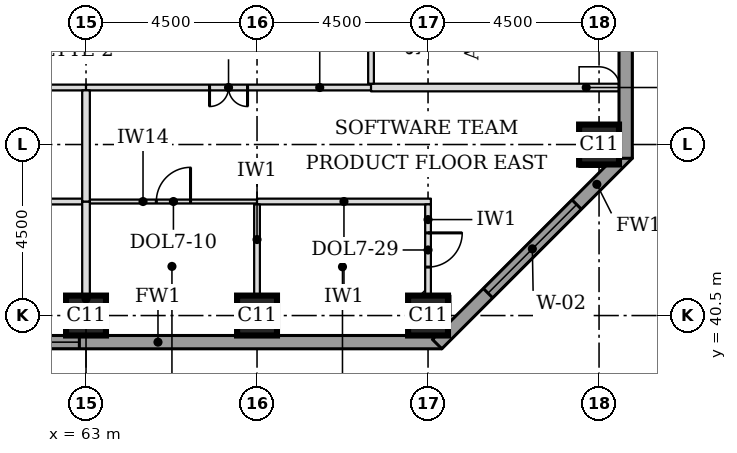
"""IFC4 building model, lengths in metres.
Left out: names, types, materials, properties, quantities, classifications, styles, units other than length and angle.
Written with IfcOpenShell. Run it as: python <this file> out.ifc"""

import sys

from ifc_helpers import new_model, si_unit, direction, frame, frame_2d, origin, origin_2d, place, context, subcontext, project, spatial, rectangle, extrude, element, fill, save


model = new_model("IFC4")
c1 = context("Model", 3, precision=1e-05, world=origin(), true_north=direction((0.0, 1.0)))
c2 = subcontext(c1, "Body", "Model", "MODEL_VIEW")
j1 = project(units=[si_unit("LENGTHUNIT", "METRE"), si_unit("PLANEANGLEUNIT", "RADIAN")], contexts=[c1])
p1 = place(None, origin())
s1 = spatial("IfcSite", under=j1, at=p1, CompositionType="ELEMENT")
p2 = place(p1, origin())
s2 = spatial("IfcBuilding", under=s1, at=p2, CompositionType="ELEMENT")
p3 = place(p2, frame((0.0, 0.0, 127.0)))
s3 = spatial("IfcBuildingStorey", under=s2, at=p3, CompositionType="ELEMENT", Elevation=127.0)
for number, where, z_axis, x_axis in (
    (1, (63.0, 40.5, 0.0), (0.0, 0.0, 1.0), (1.0, 0.0, 0.0)),
    (2, (67.5, 40.5, 0.0), (0.0, 0.0, 1.0), (1.0, 0.0, 0.0)),
    (3, (72.0, 40.5, 0.0), (0.0, 0.0, 1.0), (1.0, 0.0, 0.0)),
    (4, (76.5, 45.0, 0.0), (0.0, 0.0, 1.0), (1.0, 0.0, 0.0)),
):
    element("IfcColumn", number, at=place(p3, frame(where, z_axis=z_axis, x_axis=x_axis)), inside=s3, PredefinedType="COLUMN", context=c2, shape_type="SweptSolid", body=[
        extrude(rectangle(XDim=1.05, YDim=1.05, at=origin_2d()), origin(), (0.0, 0.0, 1.0), 3.7),
    ])
p4 = place(p3, frame((59.025, 39.8, 0.0), z_axis=(0.0, 0.0, 1.0), x_axis=(1.0, 0.0, 0.0)))
e5 = element("IfcWall", 5, at=p4, inside=s3, PredefinedType="STANDARD", context=c2, shape_type="SweptSolid", body=[
    extrude(rectangle(XDim=13.337, YDim=0.35, at=frame_2d((6.669, 0.0))), origin(), (0.0, 0.0, 1.0), 3.525),
])
p5 = place(p4, frame((0.5, 0.0, 0.9)))
e6 = element("IfcOpeningElement", 6, at=p5, cuts=e5, PredefinedType="OPENING", context=c2, shape_type="SweptSolid", body=[
    extrude(rectangle(XDim=3.3, YDim=1.9, at=frame_2d((1.65, 0.95))), frame((0.0, 0.185, 0.0), z_axis=(0.0, -1.0, 0.0), x_axis=(1.0, 0.0, 0.0)), (0.0, 0.0, 1.0), 0.37),
])
p6 = place(p3, frame((72.239, 39.749, 0.0), z_axis=(0.0, 0.0, 1.0), x_axis=(0.707106781187, 0.707106781187, 0.0)))
e7 = element("IfcWall", 7, at=p6, inside=s3, PredefinedType="STANDARD", context=c2, shape_type="SweptSolid", body=[
    extrude(rectangle(XDim=7.089, YDim=0.35, at=frame_2d((3.544, 0.0))), origin(), (0.0, 0.0, 1.0), 3.525),
])
p7 = place(p6, frame((1.894, 0.0, 0.9)))
e8 = element("IfcOpeningElement", 8, at=p7, cuts=e7, PredefinedType="OPENING", context=c2, shape_type="SweptSolid", body=[
    extrude(rectangle(XDim=3.3, YDim=1.9, at=frame_2d((1.65, 0.95))), frame((0.0, 0.185, 0.0), z_axis=(0.0, -1.0, 0.0), x_axis=(1.0, 0.0, 0.0)), (0.0, 0.0, 1.0), 0.37),
])
p8 = place(p3, frame((77.2, 44.638, 0.0), z_axis=(0.0, 0.0, 1.0), x_axis=(0.0, 1.0, 0.0)))
e9 = element("IfcWall", 9, at=p8, inside=s3, PredefinedType="STANDARD", context=c2, shape_type="SweptSolid", body=[
    extrude(rectangle(XDim=32.225, YDim=0.35, at=frame_2d((16.112, 0.0))), origin(), (0.0, 0.0, 1.0), 3.525),
])
p9 = place(p8, frame((5.462, 0.0, 0.9)))
e10 = element("IfcOpeningElement", 10, at=p9, cuts=e9, PredefinedType="OPENING", context=c2, shape_type="SweptSolid", body=[
    extrude(rectangle(XDim=3.3, YDim=1.9, at=frame_2d((1.65, 0.95))), frame((0.0, 0.185, 0.0), z_axis=(0.0, -1.0, 0.0), x_axis=(1.0, 0.0, 0.0)), (0.0, 0.0, 1.0), 0.37),
])
p10 = place(p8, frame((9.962, 0.0, 0.9)))
e11 = element("IfcOpeningElement", 11, at=p10, cuts=e9, PredefinedType="OPENING", context=c2, shape_type="SweptSolid", body=[
    extrude(rectangle(XDim=3.3, YDim=1.9, at=frame_2d((1.65, 0.95))), frame((0.0, 0.185, 0.0), z_axis=(0.0, -1.0, 0.0), x_axis=(1.0, 0.0, 0.0)), (0.0, 0.0, 1.0), 0.37),
])
p11 = place(p8, frame((14.462, 0.0, 0.9)))
e12 = element("IfcOpeningElement", 12, at=p11, cuts=e9, PredefinedType="OPENING", context=c2, shape_type="SweptSolid", body=[
    extrude(rectangle(XDim=3.3, YDim=1.9, at=frame_2d((1.65, 0.95))), frame((0.0, 0.185, 0.0), z_axis=(0.0, -1.0, 0.0), x_axis=(1.0, 0.0, 0.0)), (0.0, 0.0, 1.0), 0.37),
])
p12 = place(p8, frame((18.962, 0.0, 0.9)))
e13 = element("IfcOpeningElement", 13, at=p12, cuts=e9, PredefinedType="OPENING", context=c2, shape_type="SweptSolid", body=[
    extrude(rectangle(XDim=3.3, YDim=1.9, at=frame_2d((1.65, 0.95))), frame((0.0, 0.185, 0.0), z_axis=(0.0, -1.0, 0.0), x_axis=(1.0, 0.0, 0.0)), (0.0, 0.0, 1.0), 0.37),
])
p13 = place(p8, frame((23.462, 0.0, 0.9)))
e14 = element("IfcOpeningElement", 14, at=p13, cuts=e9, PredefinedType="OPENING", context=c2, shape_type="SweptSolid", body=[
    extrude(rectangle(XDim=3.3, YDim=1.9, at=frame_2d((1.65, 0.95))), frame((0.0, 0.185, 0.0), z_axis=(0.0, -1.0, 0.0), x_axis=(1.0, 0.0, 0.0)), (0.0, 0.0, 1.0), 0.37),
])
p14 = place(p3, frame((59.925, 43.5, 0.0), z_axis=(0.0, 0.0, 1.0), x_axis=(1.0, 0.0, 0.0)))
e15 = element("IfcWall", 15, at=p14, inside=s3, PredefinedType="PARTITIONING", context=c2, shape_type="SweptSolid", body=[
    extrude(rectangle(XDim=2.975, YDim=0.15, at=frame_2d((1.487, 0.0))), origin(), (0.0, 0.0, 1.0), 3.55),
])
p15 = place(p14, frame((1.05, 0.0, 0.0)))
e16 = element("IfcOpeningElement", 16, at=p15, cuts=e15, PredefinedType="OPENING", context=c2, shape_type="SweptSolid", body=[
    extrude(rectangle(XDim=0.9, YDim=2.1, at=frame_2d((0.45, 1.05))), frame((0.0, 0.085, 0.0), z_axis=(0.0, -1.0, 0.0), x_axis=(1.0, 0.0, 0.0)), (0.0, 0.0, 1.0), 0.17),
])
p16 = place(p3, frame((63.1, 43.5, 0.0), z_axis=(0.0, 0.0, 1.0), x_axis=(1.0, 0.0, 0.0)))
e17 = element("IfcWall", 17, at=p16, inside=s3, PredefinedType="PARTITIONING", context=c2, shape_type="SweptSolid", body=[
    extrude(rectangle(XDim=4.4, YDim=0.1, at=frame_2d((2.2, 0.0))), origin(), (0.0, 0.0, 1.0), 3.55),
])
p17 = place(p16, frame((1.75, 0.0, 0.0)))
e18 = element("IfcOpeningElement", 18, at=p17, cuts=e17, PredefinedType="OPENING", context=c2, shape_type="SweptSolid", body=[
    extrude(rectangle(XDim=0.9, YDim=2.1, at=frame_2d((0.45, 1.05))), frame((0.0, 0.06, 0.0), z_axis=(0.0, -1.0, 0.0), x_axis=(1.0, 0.0, 0.0)), (0.0, 0.0, 1.0), 0.12),
])
p18 = place(p3, frame((67.5, 43.5, 0.0), z_axis=(0.0, 0.0, 1.0), x_axis=(1.0, 0.0, 0.0)))
e19 = element("IfcWall", 19, at=p18, inside=s3, PredefinedType="PARTITIONING", context=c2, shape_type="SweptSolid", body=[
    extrude(rectangle(XDim=4.575, YDim=0.15, at=frame_2d((2.288, 0.0))), origin(), (0.0, 0.0, 1.0), 3.55),
])
p19 = place(p3, frame((60.0, 46.5, 0.0), z_axis=(0.0, 0.0, 1.0), x_axis=(1.0, 0.0, 0.0)))
e20 = element("IfcWall", 20, at=p19, inside=s3, PredefinedType="PARTITIONING", context=c2, shape_type="SweptSolid", body=[
    extrude(rectangle(XDim=3.0, YDim=0.15, at=frame_2d((1.5, 0.0))), origin(), (0.0, 0.0, 1.0), 3.55),
])
p20 = place(p3, frame((63.0, 46.5, 0.0), z_axis=(0.0, 0.0, 1.0), x_axis=(1.0, 0.0, 0.0)))
e21 = element("IfcWall", 21, at=p20, inside=s3, PredefinedType="PARTITIONING", context=c2, shape_type="SweptSolid", body=[
    extrude(rectangle(XDim=7.5, YDim=0.15, at=frame_2d((3.75, 0.0))), origin(), (0.0, 0.0, 1.0), 3.55),
])
p21 = place(p20, frame((3.25, 0.0, 0.0)))
e22 = element("IfcOpeningElement", 22, at=p21, cuts=e21, PredefinedType="OPENING", context=c2, shape_type="SweptSolid", body=[
    extrude(rectangle(XDim=1.0, YDim=2.1, at=frame_2d((0.5, 1.05))), frame((0.0, 0.085, 0.0), z_axis=(0.0, -1.0, 0.0), x_axis=(1.0, 0.0, 0.0)), (0.0, 0.0, 1.0), 0.17),
])
p22 = place(p3, frame((70.5, 46.5, 0.0), z_axis=(0.0, 0.0, 1.0), x_axis=(1.0, 0.0, 0.0)))
e23 = element("IfcWall", 23, at=p22, inside=s3, PredefinedType="PARTITIONING", context=c2, shape_type="SweptSolid", body=[
    extrude(rectangle(XDim=6.525, YDim=0.2, at=frame_2d((3.262, 0.0))), origin(), (0.0, 0.0, 1.0), 3.55),
])
p23 = place(p3, frame((63.0, 39.975, 0.0), z_axis=(0.0, 0.0, 1.0), x_axis=(0.0, 1.0, 0.0)))
e24 = element("IfcWall", 24, at=p23, inside=s3, PredefinedType="PARTITIONING", context=c2, shape_type="SweptSolid", body=[
    extrude(rectangle(XDim=3.525, YDim=0.2, at=frame_2d((1.762, 0.0))), origin(), (0.0, 0.0, 1.0), 3.55),
])
p24 = place(p3, frame((67.5, 39.975, 0.0), z_axis=(0.0, 0.0, 1.0), x_axis=(0.0, 1.0, 0.0)))
e25 = element("IfcWall", 25, at=p24, inside=s3, PredefinedType="PARTITIONING", context=c2, shape_type="SweptSolid", body=[
    extrude(rectangle(XDim=3.45, YDim=0.15, at=frame_2d((1.725, 0.0))), origin(), (0.0, 0.0, 1.0), 3.55),
])
p25 = place(p3, frame((72.0, 41.025, 0.0), z_axis=(0.0, 0.0, 1.0), x_axis=(0.0, 1.0, 0.0)))
e26 = element("IfcWall", 26, at=p25, inside=s3, PredefinedType="PARTITIONING", context=c2, shape_type="SweptSolid", body=[
    extrude(rectangle(XDim=2.4, YDim=0.15, at=frame_2d((1.2, 0.0))), origin(), (0.0, 0.0, 1.0), 3.55),
])
p26 = place(p25, frame((0.75, 0.0, 0.0)))
e27 = element("IfcOpeningElement", 27, at=p26, cuts=e26, PredefinedType="OPENING", context=c2, shape_type="SweptSolid", body=[
    extrude(rectangle(XDim=0.9, YDim=2.1, at=frame_2d((0.45, 1.05))), frame((0.0, 0.085, 0.0), z_axis=(0.0, -1.0, 0.0), x_axis=(1.0, 0.0, 0.0)), (0.0, 0.0, 1.0), 0.17),
])
p27 = place(p3, frame((63.0, 43.5, 0.0), z_axis=(0.0, 0.0, 1.0), x_axis=(0.0, 1.0, 0.0)))
e28 = element("IfcWall", 28, at=p27, inside=s3, PredefinedType="PARTITIONING", context=c2, shape_type="SweptSolid", body=[
    extrude(rectangle(XDim=2.925, YDim=0.2, at=frame_2d((1.462, 0.0))), origin(), (0.0, 0.0, 1.0), 3.55),
])
p28 = place(p3, frame((70.5, 46.6, 0.0), z_axis=(0.0, 0.0, 1.0), x_axis=(0.0, 1.0, 0.0)))
e29 = element("IfcWall", 29, at=p28, inside=s3, PredefinedType="PARTITIONING", context=c2, shape_type="SweptSolid", body=[
    extrude(rectangle(XDim=13.4, YDim=0.15, at=frame_2d((6.7, 0.0))), origin(), (0.0, 0.0, 1.0), 3.55),
])
p29 = place(p28, frame((6.2, 0.0, 0.0)))
e30 = element("IfcOpeningElement", 30, at=p29, cuts=e29, PredefinedType="OPENING", context=c2, shape_type="SweptSolid", body=[
    extrude(rectangle(XDim=1.0, YDim=2.1, at=frame_2d((0.5, 1.05))), frame((0.0, 0.085, 0.0), z_axis=(0.0, -1.0, 0.0), x_axis=(1.0, 0.0, 0.0)), (0.0, 0.0, 1.0), 0.17),
])
p30 = place(p5, origin())
e31 = element("IfcWindow", 31, at=p30, inside=s3, PartitioningType="SINGLE_PANEL", PredefinedType="WINDOW", context=c2, shape_type="SweptSolid", body=[
    extrude(rectangle(XDim=3.3, YDim=1.9, at=frame_2d((1.65, 0.95))), frame((0.0, 0.085, 0.0), z_axis=(0.0, -1.0, 0.0), x_axis=(1.0, 0.0, 0.0)), (0.0, 0.0, 1.0), 0.06),
])
fill(e6, e31)
p31 = place(p7, origin())
e32 = element("IfcWindow", 32, at=p31, inside=s3, PartitioningType="SINGLE_PANEL", PredefinedType="WINDOW", context=c2, shape_type="SweptSolid", body=[
    extrude(rectangle(XDim=3.3, YDim=1.9, at=frame_2d((1.65, 0.95))), frame((0.0, 0.085, 0.0), z_axis=(0.0, -1.0, 0.0), x_axis=(1.0, 0.0, 0.0)), (0.0, 0.0, 1.0), 0.06),
])
fill(e8, e32)
p32 = place(p21, frame((1.0, 0.0, 0.0), z_axis=(0.0, 0.0, 1.0), x_axis=(-1.0, 0.0, 0.0)))
e33 = element("IfcDoor", 33, at=p32, inside=s3, OperationType="DOUBLE_DOOR_SINGLE_SWING", PredefinedType="DOOR", context=c2, shape_type="SweptSolid", body=[
    extrude(rectangle(XDim=1.0, YDim=2.1, at=frame_2d((0.5, 1.05))), frame((0.0, 0.025, 0.0), z_axis=(0.0, -1.0, 0.0), x_axis=(1.0, 0.0, 0.0)), (0.0, 0.0, 1.0), 0.05),
])
fill(e22, e33)
p33 = place(p17, origin())
e34 = element("IfcDoor", 34, at=p33, inside=s3, OperationType="SINGLE_SWING_RIGHT", PredefinedType="DOOR", context=c2, shape_type="SweptSolid", body=[
    extrude(rectangle(XDim=0.9, YDim=2.1, at=frame_2d((0.45, 1.05))), frame((0.0, 0.025, 0.0), z_axis=(0.0, -1.0, 0.0), x_axis=(1.0, 0.0, 0.0)), (0.0, 0.0, 1.0), 0.05),
])
fill(e18, e34)
p34 = place(p26, frame((0.9, 0.0, 0.0), z_axis=(0.0, 0.0, 1.0), x_axis=(-1.0, 0.0, 0.0)))
e35 = element("IfcDoor", 35, at=p34, inside=s3, OperationType="SINGLE_SWING_LEFT", PredefinedType="DOOR", context=c2, shape_type="SweptSolid", body=[
    extrude(rectangle(XDim=0.9, YDim=2.1, at=frame_2d((0.45, 1.05))), frame((0.0, 0.025, 0.0), z_axis=(0.0, -1.0, 0.0), x_axis=(1.0, 0.0, 0.0)), (0.0, 0.0, 1.0), 0.05),
])
fill(e27, e35)
save(model, sys.argv[1])
